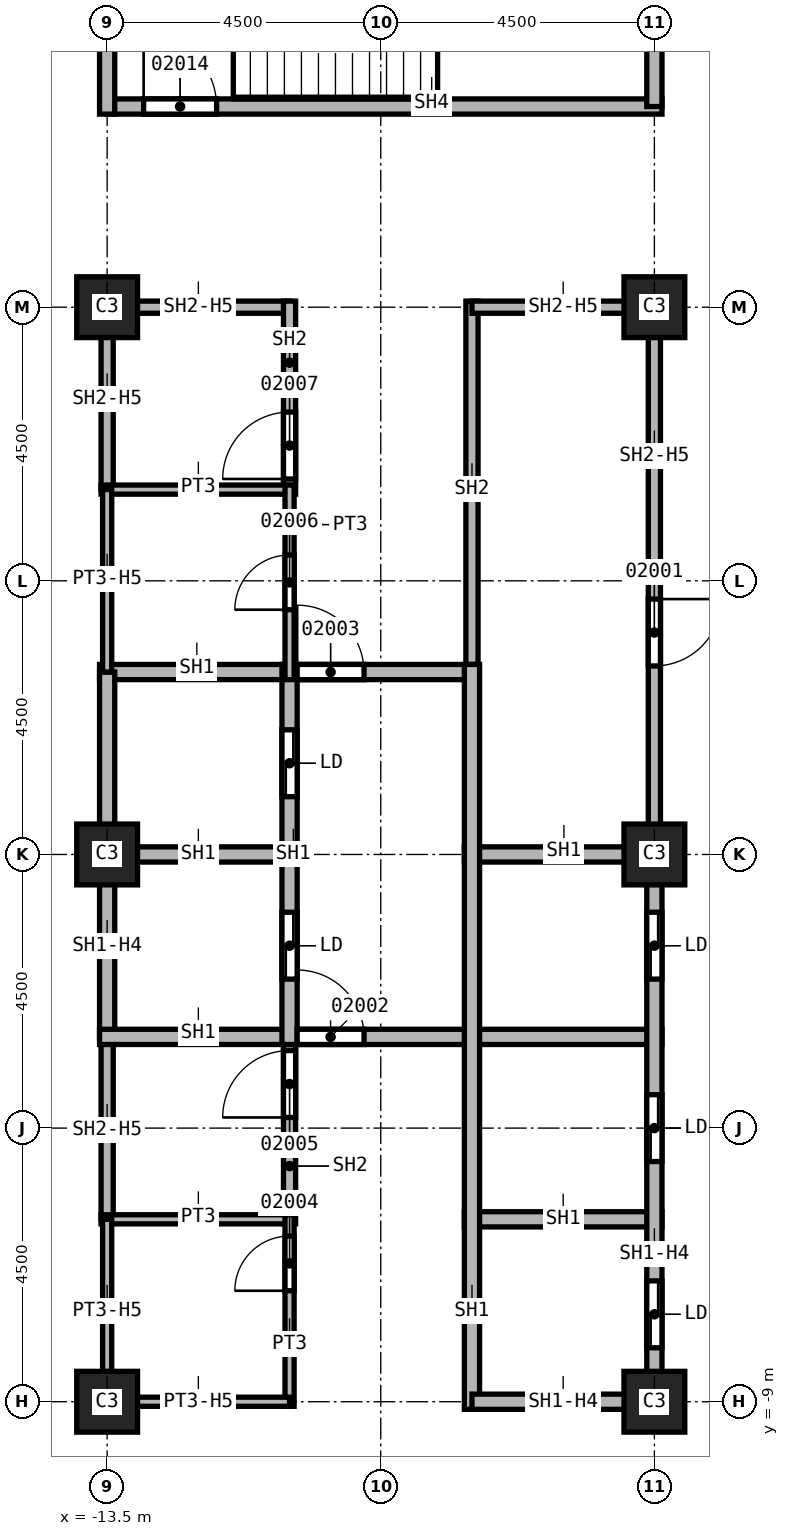
"""IFC4 building model, lengths in metres.
Left out: names, types, materials, properties, quantities, classifications, styles, units other than length and angle.
Written with IfcOpenShell. Run it as: python <this file> out.ifc"""

import sys

from ifc_helpers import new_model, si_unit, direction, frame, frame_2d, origin, origin_2d, place, context, subcontext, project, spatial, rectangle, extrude, element, fill, save


model = new_model("IFC4")
c1 = context("Model", 3, precision=1e-05, world=origin(), true_north=direction((0.0, 1.0)))
c2 = subcontext(c1, "Body", "Model", "MODEL_VIEW")
j1 = project(units=[si_unit("LENGTHUNIT", "METRE"), si_unit("PLANEANGLEUNIT", "RADIAN")], contexts=[c1])
p1 = place(None, origin())
s1 = spatial("IfcSite", under=j1, at=p1, CompositionType="ELEMENT")
p2 = place(p1, origin())
s2 = spatial("IfcBuilding", under=s1, at=p2, CompositionType="ELEMENT")
p3 = place(p2, frame((0.0, 0.0, 80.0)))
s3 = spatial("IfcBuildingStorey", under=s2, at=p3, CompositionType="ELEMENT", Elevation=80.0)
for number, where, z_axis, x_axis in (
    (1, (-4.5, 0.0, 0.0), (0.0, 0.0, 1.0), (1.0, 0.0, 0.0)),
    (2, (-4.5, 9.0, 0.0), (0.0, 0.0, 1.0), (1.0, 0.0, 0.0)),
    (3, (-4.5, -9.0, 0.0), (0.0, 0.0, 1.0), (1.0, 0.0, 0.0)),
    (4, (-13.5, 0.0, 0.0), (0.0, 0.0, 1.0), (1.0, 0.0, 0.0)),
    (5, (-13.5, 9.0, 0.0), (0.0, 0.0, 1.0), (1.0, 0.0, 0.0)),
    (6, (-13.5, -9.0, 0.0), (0.0, 0.0, 1.0), (1.0, 0.0, 0.0)),
):
    element("IfcColumn", number, at=place(p3, frame(where, z_axis=z_axis, x_axis=x_axis)), inside=s3, PredefinedType="COLUMN", context=c2, shape_type="SweptSolid", body=[
        extrude(rectangle(XDim=1.0, YDim=1.0, at=origin_2d()), origin(), (0.0, 0.0, 1.0), 3.7),
    ])
p4 = place(p3, frame((-13.5, -6.0, 0.0), z_axis=(0.0, 0.0, 1.0), x_axis=(0.0, 1.0, 0.0)))
e7 = element("IfcWall", 7, at=p4, inside=s3, PredefinedType="SOLIDWALL", context=c2, shape_type="SweptSolid", body=[
    extrude(rectangle(XDim=3.0, YDim=0.2, at=frame_2d((1.5, 0.0))), origin(), (0.0, 0.0, 1.0), 2.938),
])
p5 = place(p3, frame((-13.5, 6.0, 0.0), z_axis=(0.0, 0.0, 1.0), x_axis=(0.0, 1.0, 0.0)))
e8 = element("IfcWall", 8, at=p5, inside=s3, PredefinedType="SOLIDWALL", context=c2, shape_type="SweptSolid", body=[
    extrude(rectangle(XDim=3.1, YDim=0.2, at=frame_2d((1.55, 0.0))), origin(), (0.0, 0.0, 1.0), 2.938),
])
p6 = place(p3, frame((-13.5, 9.0, 0.0), z_axis=(0.0, 0.0, 1.0), x_axis=(1.0, 0.0, 0.0)))
e9 = element("IfcWall", 9, at=p6, inside=s3, PredefinedType="SOLIDWALL", context=c2, shape_type="SweptSolid", body=[
    extrude(rectangle(XDim=3.0, YDim=0.2, at=frame_2d((1.5, 0.0))), origin(), (0.0, 0.0, 1.0), 2.938),
])
p7 = place(p3, frame((-10.5, -6.075, 0.0), z_axis=(0.0, 0.0, 1.0), x_axis=(0.0, 1.0, 0.0)))
e10 = element("IfcWall", 10, at=p7, inside=s3, PredefinedType="SOLIDWALL", context=c2, shape_type="SweptSolid", body=[
    extrude(rectangle(XDim=3.2, YDim=0.2, at=frame_2d((1.6, 0.0))), origin(), (0.0, 0.0, 1.0), 3.7),
])
p8 = place(p7, frame((1.75, 0.0, 0.0)))
e11 = element("IfcOpeningElement", 11, at=p8, cuts=e10, PredefinedType="OPENING", context=c2, shape_type="SweptSolid", body=[
    extrude(rectangle(XDim=1.1, YDim=2.1, at=frame_2d((0.55, 1.05))), frame((0.0, 0.1, 0.0), z_axis=(0.0, -1.0, 0.0), x_axis=(1.0, 0.0, 0.0)), (0.0, 0.0, 1.0), 0.2),
])
p9 = place(p3, frame((-10.5, 5.925, 0.0), z_axis=(0.0, 0.0, 1.0), x_axis=(0.0, 1.0, 0.0)))
e12 = element("IfcWall", 12, at=p9, inside=s3, PredefinedType="SOLIDWALL", context=c2, shape_type="SweptSolid", body=[
    extrude(rectangle(XDim=3.175, YDim=0.2, at=frame_2d((1.587, 0.0))), origin(), (0.0, 0.0, 1.0), 3.7),
])
p10 = place(p9, frame((0.25, 0.0, 0.0)))
e13 = element("IfcOpeningElement", 13, at=p10, cuts=e12, PredefinedType="OPENING", context=c2, shape_type="SweptSolid", body=[
    extrude(rectangle(XDim=1.1, YDim=2.1, at=frame_2d((0.55, 1.05))), frame((0.0, 0.1, 0.0), z_axis=(0.0, -1.0, 0.0), x_axis=(1.0, 0.0, 0.0)), (0.0, 0.0, 1.0), 0.2),
])
p11 = place(p3, frame((-7.5, 2.875, 0.0), z_axis=(0.0, 0.0, 1.0), x_axis=(0.0, 1.0, 0.0)))
e14 = element("IfcWall", 14, at=p11, inside=s3, PredefinedType="SOLIDWALL", context=c2, shape_type="SweptSolid", body=[
    extrude(rectangle(XDim=6.225, YDim=0.2, at=frame_2d((3.113, 0.0))), origin(), (0.0, 0.0, 1.0), 3.7),
])
p12 = place(p3, frame((-7.5, 9.0, 0.0), z_axis=(0.0, 0.0, 1.0), x_axis=(1.0, 0.0, 0.0)))
e15 = element("IfcWall", 15, at=p12, inside=s3, PredefinedType="SOLIDWALL", context=c2, shape_type="SweptSolid", body=[
    extrude(rectangle(XDim=3.0, YDim=0.2, at=frame_2d((1.5, 0.0))), origin(), (0.0, 0.0, 1.0), 2.938),
])
p13 = place(p3, frame((-4.5, 9.1, 0.0), z_axis=(0.0, 0.0, 1.0), x_axis=(0.0, -1.0, 0.0)))
e16 = element("IfcWall", 16, at=p13, inside=s3, PredefinedType="SOLIDWALL", context=c2, shape_type="SweptSolid", body=[
    extrude(rectangle(XDim=9.1, YDim=0.2, at=frame_2d((4.55, 0.0))), origin(), (0.0, 0.0, 1.0), 2.938),
])
p14 = place(p13, frame((4.9, 0.0, 0.0)))
e17 = element("IfcOpeningElement", 17, at=p14, cuts=e16, PredefinedType="OPENING", context=c2, shape_type="SweptSolid", body=[
    extrude(rectangle(XDim=1.1, YDim=2.1, at=frame_2d((0.55, 1.05))), frame((0.0, 0.1, 0.0), z_axis=(0.0, -1.0, 0.0), x_axis=(1.0, 0.0, 0.0)), (0.0, 0.0, 1.0), 0.2),
])
p15 = place(p3, frame((-13.625, 0.0, 0.0), z_axis=(0.0, 0.0, 1.0), x_axis=(1.0, 0.0, 0.0)))
e18 = element("IfcWall", 18, at=p15, inside=s3, PredefinedType="SOLIDWALL", context=c2, shape_type="SweptSolid", body=[
    extrude(rectangle(XDim=3.125, YDim=0.25, at=frame_2d((1.562, 0.0))), origin(), (0.0, 0.0, 1.0), 3.7),
])
p16 = place(p3, frame((-13.625, 3.0, 0.0), z_axis=(0.0, 0.0, 1.0), x_axis=(1.0, 0.0, 0.0)))
e19 = element("IfcWall", 19, at=p16, inside=s3, PredefinedType="SOLIDWALL", context=c2, shape_type="SweptSolid", body=[
    extrude(rectangle(XDim=6.125, YDim=0.25, at=frame_2d((3.062, 0.0))), origin(), (0.0, 0.0, 1.0), 3.7),
])
p17 = place(p16, frame((3.25, 0.0, 0.0)))
e20 = element("IfcOpeningElement", 20, at=p17, cuts=e19, PredefinedType="OPENING", context=c2, shape_type="SweptSolid", body=[
    extrude(rectangle(XDim=1.1, YDim=2.1, at=frame_2d((0.55, 1.05))), frame((0.0, 0.125, 0.0), z_axis=(0.0, -1.0, 0.0), x_axis=(1.0, 0.0, 0.0)), (0.0, 0.0, 1.0), 0.25),
])
p18 = place(p3, frame((-13.5, -3.0, 0.0), z_axis=(0.0, 0.0, 1.0), x_axis=(0.0, 1.0, 0.0)))
e21 = element("IfcWall", 21, at=p18, inside=s3, PredefinedType="SOLIDWALL", context=c2, shape_type="SweptSolid", body=[
    extrude(rectangle(XDim=6.0, YDim=0.25, at=frame_2d((3.0, 0.0))), origin(), (0.0, 0.0, 1.0), 2.938),
])
p19 = place(p3, frame((-13.625, -3.0, 0.0), z_axis=(0.0, 0.0, 1.0), x_axis=(1.0, 0.0, 0.0)))
e22 = element("IfcWall", 22, at=p19, inside=s3, PredefinedType="SOLIDWALL", context=c2, shape_type="SweptSolid", body=[
    extrude(rectangle(XDim=9.25, YDim=0.25, at=frame_2d((4.625, 0.0))), origin(), (0.0, 0.0, 1.0), 3.7),
])
p20 = place(p19, frame((3.25, 0.0, 0.0)))
e23 = element("IfcOpeningElement", 23, at=p20, cuts=e22, PredefinedType="OPENING", context=c2, shape_type="SweptSolid", body=[
    extrude(rectangle(XDim=1.1, YDim=2.1, at=frame_2d((0.55, 1.05))), frame((0.0, 0.125, 0.0), z_axis=(0.0, -1.0, 0.0), x_axis=(1.0, 0.0, 0.0)), (0.0, 0.0, 1.0), 0.25),
])
p21 = place(p3, frame((-10.5, -3.125, 0.0), z_axis=(0.0, 0.0, 1.0), x_axis=(0.0, 1.0, 0.0)))
e24 = element("IfcWall", 24, at=p21, inside=s3, PredefinedType="SOLIDWALL", context=c2, shape_type="SweptSolid", body=[
    extrude(rectangle(XDim=6.25, YDim=0.25, at=frame_2d((3.125, 0.0))), origin(), (0.0, 0.0, 1.0), 3.7),
])
p22 = place(p21, frame((1.075, 0.0, 0.0)))
e25 = element("IfcOpeningElement", 25, at=p22, cuts=e24, PredefinedType="OPENING", context=c2, shape_type="SweptSolid", body=[
    extrude(rectangle(XDim=1.1, YDim=2.1, at=frame_2d((0.55, 1.05))), frame((0.0, 0.125, 0.0), z_axis=(0.0, -1.0, 0.0), x_axis=(1.0, 0.0, 0.0)), (0.0, 0.0, 1.0), 0.25),
])
p23 = place(p21, frame((4.075, 0.0, 0.0)))
e26 = element("IfcOpeningElement", 26, at=p23, cuts=e24, PredefinedType="OPENING", context=c2, shape_type="SweptSolid", body=[
    extrude(rectangle(XDim=1.1, YDim=2.1, at=frame_2d((0.55, 1.05))), frame((0.0, 0.125, 0.0), z_axis=(0.0, -1.0, 0.0), x_axis=(1.0, 0.0, 0.0)), (0.0, 0.0, 1.0), 0.25),
])
for number, where, z_axis, x_axis in (
    (27, (-7.625, -6.0, 0.0), (0.0, 0.0, 1.0), (1.0, 0.0, 0.0)),
    (28, (-7.625, 0.0, 0.0), (0.0, 0.0, 1.0), (1.0, 0.0, 0.0)),
):
    element("IfcWall", number, at=place(p3, frame(where, z_axis=z_axis, x_axis=x_axis)), inside=s3, PredefinedType="SOLIDWALL", context=c2, shape_type="SweptSolid", body=[
        extrude(rectangle(XDim=3.25, YDim=0.25, at=frame_2d((1.625, 0.0))), origin(), (0.0, 0.0, 1.0), 3.7),
    ])
p24 = place(p3, frame((-7.5, -9.125, 0.0), z_axis=(0.0, 0.0, 1.0), x_axis=(0.0, 1.0, 0.0)))
e29 = element("IfcWall", 29, at=p24, inside=s3, PredefinedType="SOLIDWALL", context=c2, shape_type="SweptSolid", body=[
    extrude(rectangle(XDim=12.25, YDim=0.25, at=frame_2d((6.125, 0.0))), origin(), (0.0, 0.0, 1.0), 3.7),
])
p25 = place(p3, frame((-4.5, -9.0, 0.0), z_axis=(0.0, 0.0, 1.0), x_axis=(-1.0, 0.0, 0.0)))
e30 = element("IfcWall", 30, at=p25, inside=s3, PredefinedType="SOLIDWALL", context=c2, shape_type="SweptSolid", body=[
    extrude(rectangle(XDim=3.0, YDim=0.25, at=frame_2d((1.5, 0.0))), origin(), (0.0, 0.0, 1.0), 2.938),
])
p26 = place(p3, frame((-4.5, 0.0, 0.0), z_axis=(0.0, 0.0, 1.0), x_axis=(0.0, -1.0, 0.0)))
e31 = element("IfcWall", 31, at=p26, inside=s3, PredefinedType="SOLIDWALL", context=c2, shape_type="SweptSolid", body=[
    extrude(rectangle(XDim=9.125, YDim=0.25, at=frame_2d((4.562, 0.0))), origin(), (0.0, 0.0, 1.0), 2.938),
])
p27 = place(p26, frame((7.012, 0.0, 0.0)))
e32 = element("IfcOpeningElement", 32, at=p27, cuts=e31, PredefinedType="OPENING", context=c2, shape_type="SweptSolid", body=[
    extrude(rectangle(XDim=1.1, YDim=2.1, at=frame_2d((0.55, 1.05))), frame((0.0, 0.125, 0.0), z_axis=(0.0, -1.0, 0.0), x_axis=(1.0, 0.0, 0.0)), (0.0, 0.0, 1.0), 0.25),
])
p28 = place(p26, frame((3.95, 0.0, 0.0)))
e33 = element("IfcOpeningElement", 33, at=p28, cuts=e31, PredefinedType="OPENING", context=c2, shape_type="SweptSolid", body=[
    extrude(rectangle(XDim=1.1, YDim=2.1, at=frame_2d((0.55, 1.05))), frame((0.0, 0.125, 0.0), z_axis=(0.0, -1.0, 0.0), x_axis=(1.0, 0.0, 0.0)), (0.0, 0.0, 1.0), 0.25),
])
p29 = place(p26, frame((0.95, 0.0, 0.0)))
e34 = element("IfcOpeningElement", 34, at=p29, cuts=e31, PredefinedType="OPENING", context=c2, shape_type="SweptSolid", body=[
    extrude(rectangle(XDim=1.1, YDim=2.1, at=frame_2d((0.55, 1.05))), frame((0.0, 0.125, 0.0), z_axis=(0.0, -1.0, 0.0), x_axis=(1.0, 0.0, 0.0)), (0.0, 0.0, 1.0), 0.25),
])
p30 = place(p3, frame((-13.5, 12.3, 0.0), z_axis=(0.0, 0.0, 1.0), x_axis=(1.0, 0.0, 0.0)))
e35 = element("IfcWall", 35, at=p30, inside=s3, PredefinedType="SOLIDWALL", context=c2, shape_type="SweptSolid", body=[
    extrude(rectangle(XDim=9.125, YDim=0.25, at=frame_2d((4.562, 0.0))), origin(), (0.0, 0.0, 1.0), 3.7),
])
p31 = place(p30, frame((0.6, 0.0, 0.0)))
e36 = element("IfcOpeningElement", 36, at=p31, cuts=e35, PredefinedType="OPENING", context=c2, shape_type="SweptSolid", body=[
    extrude(rectangle(XDim=1.2, YDim=2.1, at=frame_2d((0.6, 1.05))), frame((0.0, 0.125, 0.0), z_axis=(0.0, -1.0, 0.0), x_axis=(1.0, 0.0, 0.0)), (0.0, 0.0, 1.0), 0.25),
])
p32 = place(p3, frame((-13.5, 12.175, 0.0), z_axis=(0.0, 0.0, 1.0), x_axis=(0.0, 1.0, 0.0)))
e37 = element("IfcWall", 37, at=p32, inside=s3, PredefinedType="SOLIDWALL", context=c2, shape_type="SweptSolid", body=[
    extrude(rectangle(XDim=4.75, YDim=0.25, at=frame_2d((2.375, 0.0))), origin(), (0.0, 0.0, 1.0), 3.7),
])
p33 = place(p3, frame((-4.5, 16.8, 0.0), z_axis=(0.0, 0.0, 1.0), x_axis=(0.0, -1.0, 0.0)))
e38 = element("IfcWall", 38, at=p33, inside=s3, PredefinedType="SOLIDWALL", context=c2, shape_type="SweptSolid", body=[
    extrude(rectangle(XDim=4.5, YDim=0.25, at=frame_2d((2.25, 0.0))), origin(), (0.0, 0.0, 1.0), 3.7),
])
for number, where, z_axis, x_axis in (
    (39, (-13.6, -6.0, 0.0), (0.0, 0.0, 1.0), (1.0, 0.0, 0.0)),
    (40, (-13.6, 6.0, 0.0), (0.0, 0.0, 1.0), (1.0, 0.0, 0.0)),
):
    element("IfcWall", number, at=place(p3, frame(where, z_axis=z_axis, x_axis=x_axis)), inside=s3, PredefinedType="PARTITIONING", context=c2, shape_type="SweptSolid", body=[
        extrude(rectangle(XDim=3.1, YDim=0.15, at=frame_2d((1.55, 0.0))), origin(), (0.0, 0.0, 1.0), 3.7),
    ])
p34 = place(p3, frame((-13.5, -9.075, 0.0), z_axis=(0.0, 0.0, 1.0), x_axis=(0.0, 1.0, 0.0)))
e41 = element("IfcWall", 41, at=p34, inside=s3, PredefinedType="PARTITIONING", context=c2, shape_type="SweptSolid", body=[
    extrude(rectangle(XDim=3.075, YDim=0.15, at=frame_2d((1.538, 0.0))), origin(), (0.0, 0.0, 1.0), 2.938),
])
p35 = place(p3, frame((-13.5, 3.0, 0.0), z_axis=(0.0, 0.0, 1.0), x_axis=(0.0, 1.0, 0.0)))
e42 = element("IfcWall", 42, at=p35, inside=s3, PredefinedType="PARTITIONING", context=c2, shape_type="SweptSolid", body=[
    extrude(rectangle(XDim=3.0, YDim=0.15, at=frame_2d((1.5, 0.0))), origin(), (0.0, 0.0, 1.0), 2.938),
])
p36 = place(p3, frame((-10.5, -9.075, 0.0), z_axis=(0.0, 0.0, 1.0), x_axis=(0.0, 1.0, 0.0)))
e43 = element("IfcWall", 43, at=p36, inside=s3, PredefinedType="PARTITIONING", context=c2, shape_type="SweptSolid", body=[
    extrude(rectangle(XDim=3.15, YDim=0.15, at=frame_2d((1.575, 0.0))), origin(), (0.0, 0.0, 1.0), 3.7),
])
p37 = place(p36, frame((1.9, 0.0, 0.0)))
e44 = element("IfcOpeningElement", 44, at=p37, cuts=e43, PredefinedType="OPENING", context=c2, shape_type="SweptSolid", body=[
    extrude(rectangle(XDim=0.9, YDim=2.1, at=frame_2d((0.45, 1.05))), frame((0.0, 0.075, 0.0), z_axis=(0.0, -1.0, 0.0), x_axis=(1.0, 0.0, 0.0)), (0.0, 0.0, 1.0), 0.15),
])
p38 = place(p3, frame((-10.5, -9.0, 0.0), z_axis=(0.0, 0.0, 1.0), x_axis=(-1.0, 0.0, 0.0)))
e45 = element("IfcWall", 45, at=p38, inside=s3, PredefinedType="PARTITIONING", context=c2, shape_type="SweptSolid", body=[
    extrude(rectangle(XDim=3.0, YDim=0.15, at=frame_2d((1.5, 0.0))), origin(), (0.0, 0.0, 1.0), 2.938),
])
p39 = place(p3, frame((-10.5, 2.875, 0.0), z_axis=(0.0, 0.0, 1.0), x_axis=(0.0, 1.0, 0.0)))
e46 = element("IfcWall", 46, at=p39, inside=s3, PredefinedType="PARTITIONING", context=c2, shape_type="SweptSolid", body=[
    extrude(rectangle(XDim=3.2, YDim=0.15, at=frame_2d((1.6, 0.0))), origin(), (0.0, 0.0, 1.0), 3.7),
])
p40 = place(p39, frame((1.15, 0.0, 0.0)))
e47 = element("IfcOpeningElement", 47, at=p40, cuts=e46, PredefinedType="OPENING", context=c2, shape_type="SweptSolid", body=[
    extrude(rectangle(XDim=0.9, YDim=2.1, at=frame_2d((0.45, 1.05))), frame((0.0, 0.075, 0.0), z_axis=(0.0, -1.0, 0.0), x_axis=(1.0, 0.0, 0.0)), (0.0, 0.0, 1.0), 0.15),
])
p41 = place(p14, origin())
e48 = element("IfcDoor", 48, at=p41, inside=s3, OperationType="SINGLE_SWING_RIGHT", PredefinedType="DOOR", context=c2, shape_type="SweptSolid", body=[
    extrude(rectangle(XDim=1.1, YDim=2.1, at=frame_2d((0.55, 1.05))), frame((0.0, 0.025, 0.0), z_axis=(0.0, -1.0, 0.0), x_axis=(1.0, 0.0, 0.0)), (0.0, 0.0, 1.0), 0.05),
])
fill(e17, e48)
p42 = place(p20, origin())
e49 = element("IfcDoor", 49, at=p42, inside=s3, OperationType="SINGLE_SWING_LEFT", PredefinedType="DOOR", context=c2, shape_type="SweptSolid", body=[
    extrude(rectangle(XDim=1.1, YDim=2.1, at=frame_2d((0.55, 1.05))), frame((0.0, 0.025, 0.0), z_axis=(0.0, -1.0, 0.0), x_axis=(1.0, 0.0, 0.0)), (0.0, 0.0, 1.0), 0.05),
])
fill(e23, e49)
p43 = place(p17, origin())
e50 = element("IfcDoor", 50, at=p43, inside=s3, OperationType="SINGLE_SWING_RIGHT", PredefinedType="DOOR", context=c2, shape_type="SweptSolid", body=[
    extrude(rectangle(XDim=1.1, YDim=2.1, at=frame_2d((0.55, 1.05))), frame((0.0, 0.025, 0.0), z_axis=(0.0, -1.0, 0.0), x_axis=(1.0, 0.0, 0.0)), (0.0, 0.0, 1.0), 0.05),
])
fill(e20, e50)
p44 = place(p37, origin())
e51 = element("IfcDoor", 51, at=p44, inside=s3, OperationType="SINGLE_SWING_LEFT", PredefinedType="DOOR", context=c2, shape_type="SweptSolid", body=[
    extrude(rectangle(XDim=0.9, YDim=2.1, at=frame_2d((0.45, 1.05))), frame((0.0, 0.025, 0.0), z_axis=(0.0, -1.0, 0.0), x_axis=(1.0, 0.0, 0.0)), (0.0, 0.0, 1.0), 0.05),
])
fill(e44, e51)
p45 = place(p8, origin())
e52 = element("IfcDoor", 52, at=p45, inside=s3, OperationType="SINGLE_SWING_RIGHT", PredefinedType="DOOR", context=c2, shape_type="SweptSolid", body=[
    extrude(rectangle(XDim=1.1, YDim=2.1, at=frame_2d((0.55, 1.05))), frame((0.0, 0.025, 0.0), z_axis=(0.0, -1.0, 0.0), x_axis=(1.0, 0.0, 0.0)), (0.0, 0.0, 1.0), 0.05),
])
fill(e11, e52)
p46 = place(p40, origin())
e53 = element("IfcDoor", 53, at=p46, inside=s3, OperationType="SINGLE_SWING_LEFT", PredefinedType="DOOR", context=c2, shape_type="SweptSolid", body=[
    extrude(rectangle(XDim=0.9, YDim=2.1, at=frame_2d((0.45, 1.05))), frame((0.0, 0.025, 0.0), z_axis=(0.0, -1.0, 0.0), x_axis=(1.0, 0.0, 0.0)), (0.0, 0.0, 1.0), 0.05),
])
fill(e47, e53)
p47 = place(p10, origin())
e54 = element("IfcDoor", 54, at=p47, inside=s3, OperationType="SINGLE_SWING_RIGHT", PredefinedType="DOOR", context=c2, shape_type="SweptSolid", body=[
    extrude(rectangle(XDim=1.1, YDim=2.1, at=frame_2d((0.55, 1.05))), frame((0.0, 0.025, 0.0), z_axis=(0.0, -1.0, 0.0), x_axis=(1.0, 0.0, 0.0)), (0.0, 0.0, 1.0), 0.05),
])
fill(e13, e54)
p48 = place(p31, origin())
e55 = element("IfcDoor", 55, at=p48, inside=s3, OperationType="SINGLE_SWING_LEFT", PredefinedType="DOOR", context=c2, shape_type="SweptSolid", body=[
    extrude(rectangle(XDim=1.2, YDim=2.1, at=frame_2d((0.6, 1.05))), frame((0.0, 0.025, 0.0), z_axis=(0.0, -1.0, 0.0), x_axis=(1.0, 0.0, 0.0)), (0.0, 0.0, 1.0), 0.05),
])
fill(e36, e55)
p49 = place(p27, origin())
e56 = element("IfcDoor", 56, at=p49, inside=s3, OperationType="SLIDING_TO_LEFT", PredefinedType="DOOR", context=c2, shape_type="SweptSolid", body=[
    extrude(rectangle(XDim=1.1, YDim=2.1, at=frame_2d((0.55, 1.05))), frame((0.0, 0.025, 0.0), z_axis=(0.0, -1.0, 0.0), x_axis=(1.0, 0.0, 0.0)), (0.0, 0.0, 1.0), 0.05),
])
fill(e32, e56)
p50 = place(p28, origin())
e57 = element("IfcDoor", 57, at=p50, inside=s3, OperationType="SLIDING_TO_LEFT", PredefinedType="DOOR", context=c2, shape_type="SweptSolid", body=[
    extrude(rectangle(XDim=1.1, YDim=2.1, at=frame_2d((0.55, 1.05))), frame((0.0, 0.025, 0.0), z_axis=(0.0, -1.0, 0.0), x_axis=(1.0, 0.0, 0.0)), (0.0, 0.0, 1.0), 0.05),
])
fill(e33, e57)
p51 = place(p29, origin())
e58 = element("IfcDoor", 58, at=p51, inside=s3, OperationType="SLIDING_TO_LEFT", PredefinedType="DOOR", context=c2, shape_type="SweptSolid", body=[
    extrude(rectangle(XDim=1.1, YDim=2.1, at=frame_2d((0.55, 1.05))), frame((0.0, 0.025, 0.0), z_axis=(0.0, -1.0, 0.0), x_axis=(1.0, 0.0, 0.0)), (0.0, 0.0, 1.0), 0.05),
])
fill(e34, e58)
p52 = place(p22, origin())
e59 = element("IfcDoor", 59, at=p52, inside=s3, OperationType="SLIDING_TO_LEFT", PredefinedType="DOOR", context=c2, shape_type="SweptSolid", body=[
    extrude(rectangle(XDim=1.1, YDim=2.1, at=frame_2d((0.55, 1.05))), frame((0.0, 0.025, 0.0), z_axis=(0.0, -1.0, 0.0), x_axis=(1.0, 0.0, 0.0)), (0.0, 0.0, 1.0), 0.05),
])
fill(e25, e59)
p53 = place(p23, origin())
e60 = element("IfcDoor", 60, at=p53, inside=s3, OperationType="SLIDING_TO_LEFT", PredefinedType="DOOR", context=c2, shape_type="SweptSolid", body=[
    extrude(rectangle(XDim=1.1, YDim=2.1, at=frame_2d((0.55, 1.05))), frame((0.0, 0.025, 0.0), z_axis=(0.0, -1.0, 0.0), x_axis=(1.0, 0.0, 0.0)), (0.0, 0.0, 1.0), 0.05),
])
fill(e26, e60)
save(model, sys.argv[1])
